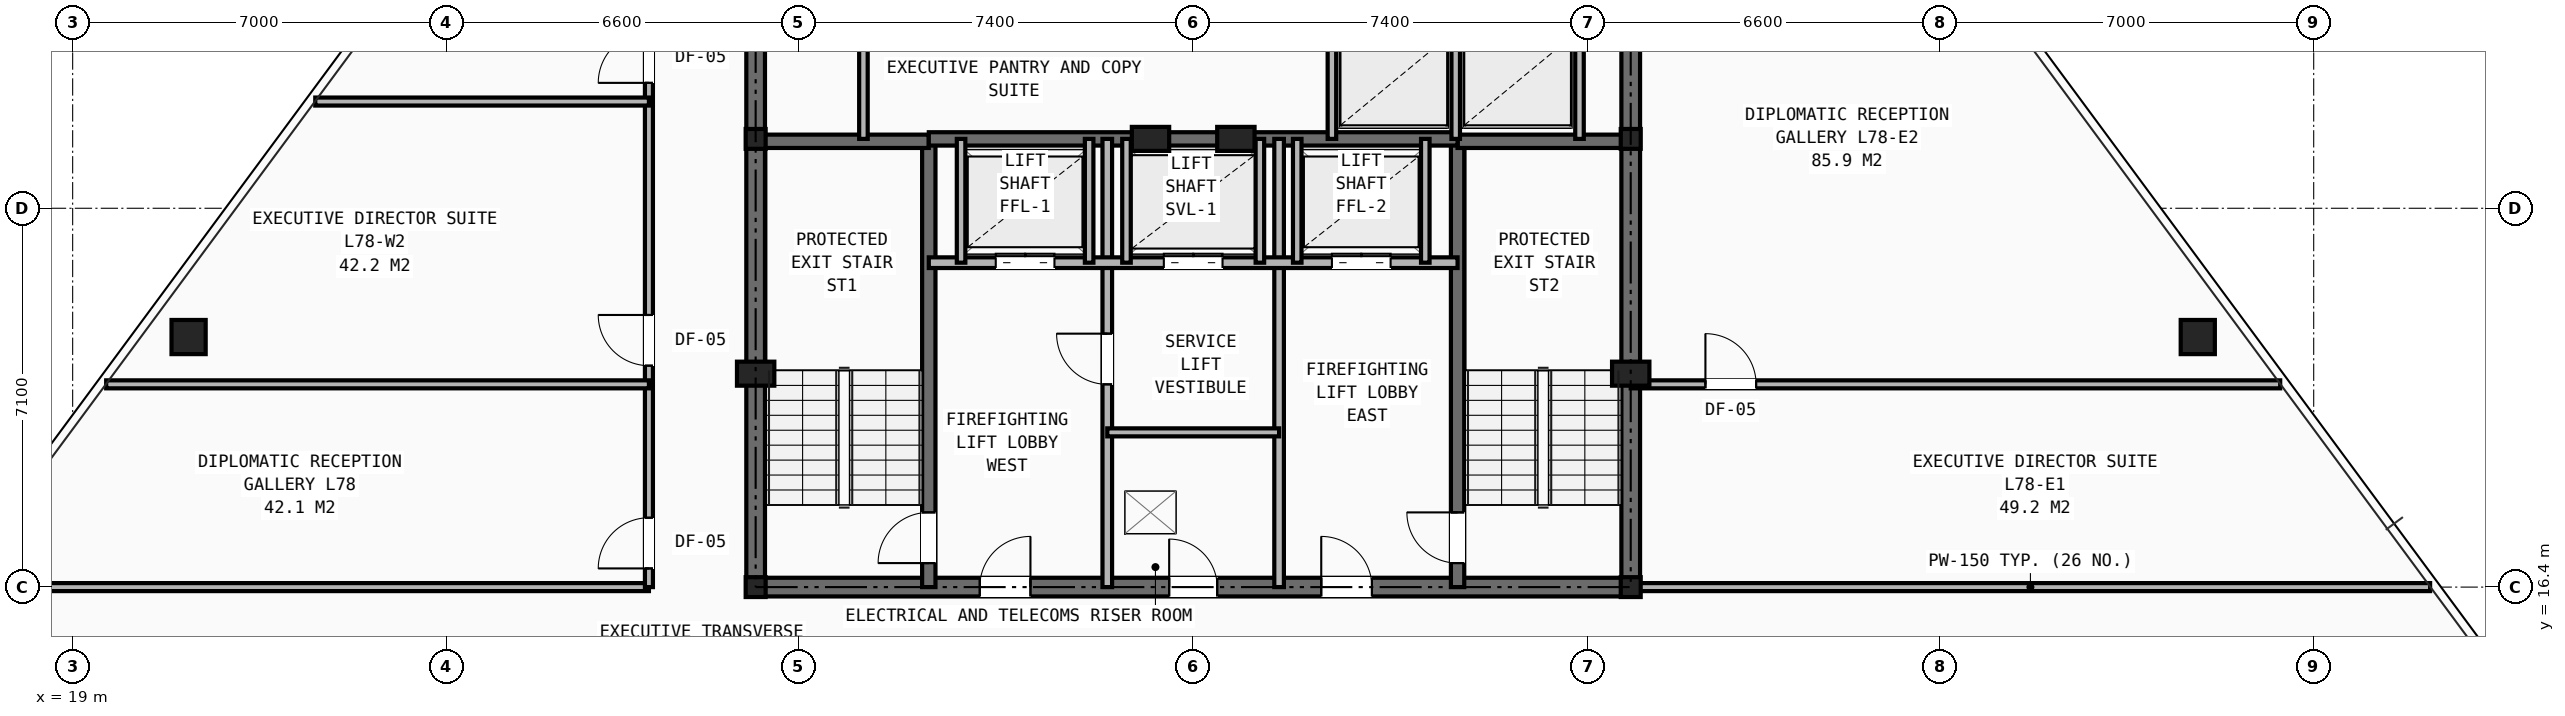
"""IFC4 building model, lengths in metres.
Left out: names, types, materials, properties, quantities, classifications, styles, units other than length and angle.
Written with IfcOpenShell. Run it as: python <this file> out.ifc"""

import sys

from ifc_helpers import new_model, si_unit, direction, frame, frame_2d, origin, origin_2d, place, context, subcontext, project, spatial, rectangle, hollow_rectangle, i_section, extrude, element, fill, save


model = new_model("IFC4")
c1 = context("Model", 3, precision=1e-05, world=origin(), true_north=direction((0.0, 1.0)))
c2 = subcontext(c1, "Body", "Model", "MODEL_VIEW")
j1 = project(units=[si_unit("LENGTHUNIT", "METRE"), si_unit("PLANEANGLEUNIT", "RADIAN")], contexts=[c1])
p1 = place(None, origin())
s1 = spatial("IfcSite", under=j1, at=p1, CompositionType="ELEMENT")
p2 = place(p1, origin())
s2 = spatial("IfcBuilding", under=s1, at=p2, CompositionType="ELEMENT")
p3 = place(p2, frame((0.0, 0.0, 276.0)))
s3 = spatial("IfcBuildingStorey", under=s2, at=p3, CompositionType="ELEMENT", Elevation=276.0)
for number, where, z_axis, x_axis in (
    (1, (31.8, 16.4, 0.0), (0.0, 0.0, 1.0), (1.0, 0.0, 0.0)),
    (2, (48.2, 16.4, 0.0), (0.0, 0.0, 1.0), (1.0, 0.0, 0.0)),
    (3, (31.8, 24.8, 0.0), (0.0, 0.0, 1.0), (1.0, 0.0, 0.0)),
    (4, (48.2, 24.8, 0.0), (0.0, 0.0, 1.0), (1.0, 0.0, 0.0)),
):
    element("IfcColumn", number, at=place(p3, frame(where, z_axis=z_axis, x_axis=x_axis)), inside=s3, PredefinedType="COLUMN", context=c2, shape_type="SweptSolid", body=[
        extrude(i_section(OverallWidth=0.374, OverallDepth=0.372, WebThickness=0.016, FlangeThickness=0.026, at=origin_2d()), origin(), (0.0, 0.0, 1.0), 3.5),
    ])
for number, where, z_axis, x_axis in (
    (5, (31.8, 20.4, 0.0), (0.0, 0.0, 1.0), (1.0, 0.0, 0.0)),
    (6, (48.2, 20.4, 0.0), (0.0, 0.0, 1.0), (1.0, 0.0, 0.0)),
    (7, (39.2, 24.8, 0.0), (0.0, 0.0, 1.0), (1.0, 0.0, 0.0)),
    (8, (40.8, 24.8, 0.0), (0.0, 0.0, 1.0), (1.0, 0.0, 0.0)),
):
    element("IfcColumn", number, at=place(p3, frame(where, z_axis=z_axis, x_axis=x_axis)), inside=s3, PredefinedType="PILASTER", context=c2, shape_type="SweptSolid", body=[
        extrude(rectangle(XDim=0.7, YDim=0.45, at=origin_2d()), origin(), (0.0, 0.0, 1.0), 3.5),
    ])
for number, where, z_axis, x_axis in (
    (9, (21.173, 21.086, 0.0), (0.0, 0.0, 1.0), (1.0, 0.0, 0.0)),
    (10, (58.827, 21.086, 0.0), (0.0, 0.0, 1.0), (1.0, 0.0, 0.0)),
):
    element("IfcColumn", number, at=place(p3, frame(where, z_axis=z_axis, x_axis=x_axis)), inside=s3, PredefinedType="COLUMN", context=c2, shape_type="SweptSolid", body=[
        extrude(hollow_rectangle(XDim=0.64, YDim=0.64, WallThickness=0.045, at=origin_2d()), origin(), (0.0, 0.0, 1.0), 3.5),
    ])
p4 = place(p3, frame((31.8, 16.4, 0.0), z_axis=(0.0, 0.0, 1.0), x_axis=(1.0, 0.0, 0.0)))
e11 = element("IfcWall", 11, at=p4, inside=s3, PredefinedType="SHEAR", context=c2, shape_type="SweptSolid", body=[
    extrude(rectangle(XDim=16.4, YDim=0.35, at=frame_2d((8.2, 0.0))), origin(), (0.0, 0.0, 1.0), 3.25),
])
p5 = place(p4, frame((7.75, 0.0, 0.0)))
e12 = element("IfcOpeningElement", 12, at=p5, cuts=e11, PredefinedType="OPENING", context=c2, shape_type="SweptSolid", body=[
    extrude(rectangle(XDim=0.9, YDim=2.1, at=frame_2d((0.45, 1.05))), frame((0.0, 0.185, 0.0), z_axis=(0.0, -1.0, 0.0), x_axis=(1.0, 0.0, 0.0)), (0.0, 0.0, 1.0), 0.37),
])
p6 = place(p4, frame((4.2, 0.0, 0.0)))
e13 = element("IfcOpeningElement", 13, at=p6, cuts=e11, PredefinedType="OPENING", context=c2, shape_type="SweptSolid", body=[
    extrude(rectangle(XDim=0.95, YDim=2.1, at=frame_2d((0.475, 1.05))), frame((0.0, 0.185, 0.0), z_axis=(0.0, -1.0, 0.0), x_axis=(1.0, 0.0, 0.0)), (0.0, 0.0, 1.0), 0.37),
])
p7 = place(p4, frame((10.6, 0.0, 0.0)))
e14 = element("IfcOpeningElement", 14, at=p7, cuts=e11, PredefinedType="OPENING", context=c2, shape_type="SweptSolid", body=[
    extrude(rectangle(XDim=0.95, YDim=2.1, at=frame_2d((0.475, 1.05))), frame((0.0, 0.185, 0.0), z_axis=(0.0, -1.0, 0.0), x_axis=(1.0, 0.0, 0.0)), (0.0, 0.0, 1.0), 0.37),
])
p8 = place(p3, frame((31.8, 16.4, 0.0), z_axis=(0.0, 0.0, 1.0), x_axis=(0.0, 1.0, 0.0)))
e15 = element("IfcWall", 15, at=p8, inside=s3, PredefinedType="SHEAR", context=c2, shape_type="SweptSolid", body=[
    extrude(rectangle(XDim=14.8, YDim=0.35, at=frame_2d((7.4, 0.0))), origin(), (0.0, 0.0, 1.0), 3.25),
])
p9 = place(p8, frame((11.0, 0.0, 0.0)))
e16 = element("IfcOpeningElement", 16, at=p9, cuts=e15, PredefinedType="OPENING", context=c2, shape_type="SweptSolid", body=[
    extrude(rectangle(XDim=1.1, YDim=2.15, at=frame_2d((0.55, 1.075))), frame((0.0, 0.185, 0.0), z_axis=(0.0, -1.0, 0.0), x_axis=(1.0, 0.0, 0.0)), (0.0, 0.0, 1.0), 0.37),
])
p10 = place(p3, frame((48.2, 16.4, 0.0), z_axis=(0.0, 0.0, 1.0), x_axis=(0.0, 1.0, 0.0)))
e17 = element("IfcWall", 17, at=p10, inside=s3, PredefinedType="SHEAR", context=c2, shape_type="SweptSolid", body=[
    extrude(rectangle(XDim=14.8, YDim=0.35, at=frame_2d((7.4, 0.0))), origin(), (0.0, 0.0, 1.0), 3.25),
])
p11 = place(p10, frame((11.0, 0.0, 0.0)))
e18 = element("IfcOpeningElement", 18, at=p11, cuts=e17, PredefinedType="OPENING", context=c2, shape_type="SweptSolid", body=[
    extrude(rectangle(XDim=1.1, YDim=2.15, at=frame_2d((0.55, 1.075))), frame((0.0, 0.185, 0.0), z_axis=(0.0, -1.0, 0.0), x_axis=(1.0, 0.0, 0.0)), (0.0, 0.0, 1.0), 0.37),
])
p12 = place(p3, frame((35.045, 16.4, 0.0), z_axis=(0.0, 0.0, 1.0), x_axis=(0.0, 1.0, 0.0)))
e19 = element("IfcWall", 19, at=p12, inside=s3, PredefinedType="SHEAR", context=c2, shape_type="SweptSolid", body=[
    extrude(rectangle(XDim=8.4, YDim=0.25, at=frame_2d((4.2, 0.0))), origin(), (0.0, 0.0, 1.0), 3.25),
])
p13 = place(p12, frame((0.45, 0.0, 0.0)))
e20 = element("IfcOpeningElement", 20, at=p13, cuts=e19, PredefinedType="OPENING", context=c2, shape_type="SweptSolid", body=[
    extrude(rectangle(XDim=0.95, YDim=2.1, at=frame_2d((0.475, 1.05))), frame((0.0, 0.135, 0.0), z_axis=(0.0, -1.0, 0.0), x_axis=(1.0, 0.0, 0.0)), (0.0, 0.0, 1.0), 0.27),
])
p14 = place(p3, frame((31.8, 24.755, 0.0), z_axis=(0.0, 0.0, 1.0), x_axis=(1.0, 0.0, 0.0)))
e21 = element("IfcWall", 21, at=p14, inside=s3, PredefinedType="SHEAR", context=c2, shape_type="SweptSolid", body=[
    extrude(rectangle(XDim=3.245, YDim=0.25, at=frame_2d((1.623, 0.0))), origin(), (0.0, 0.0, 1.0), 3.25),
])
p15 = place(p3, frame((44.955, 16.4, 0.0), z_axis=(0.0, 0.0, 1.0), x_axis=(0.0, 1.0, 0.0)))
e22 = element("IfcWall", 22, at=p15, inside=s3, PredefinedType="SHEAR", context=c2, shape_type="SweptSolid", body=[
    extrude(rectangle(XDim=8.4, YDim=0.25, at=frame_2d((4.2, 0.0))), origin(), (0.0, 0.0, 1.0), 3.25),
])
p16 = place(p15, frame((0.45, 0.0, 0.0)))
e23 = element("IfcOpeningElement", 23, at=p16, cuts=e22, PredefinedType="OPENING", context=c2, shape_type="SweptSolid", body=[
    extrude(rectangle(XDim=0.95, YDim=2.1, at=frame_2d((0.475, 1.05))), frame((0.0, 0.135, 0.0), z_axis=(0.0, -1.0, 0.0), x_axis=(1.0, 0.0, 0.0)), (0.0, 0.0, 1.0), 0.27),
])
p17 = place(p3, frame((44.955, 24.755, 0.0), z_axis=(0.0, 0.0, 1.0), x_axis=(1.0, 0.0, 0.0)))
e24 = element("IfcWall", 24, at=p17, inside=s3, PredefinedType="SHEAR", context=c2, shape_type="SweptSolid", body=[
    extrude(rectangle(XDim=3.245, YDim=0.25, at=frame_2d((1.623, 0.0))), origin(), (0.0, 0.0, 1.0), 3.25),
])
p18 = place(p3, frame((35.045, 24.8, 0.0), z_axis=(0.0, 0.0, 1.0), x_axis=(1.0, 0.0, 0.0)))
e25 = element("IfcWall", 25, at=p18, inside=s3, PredefinedType="SHEAR", context=c2, shape_type="SweptSolid", body=[
    extrude(rectangle(XDim=9.91, YDim=0.25, at=frame_2d((4.955, 0.0))), origin(), (0.0, 0.0, 1.0), 3.25),
])
p19 = place(p3, frame((38.39, 16.4, 0.0), z_axis=(0.0, 0.0, 1.0), x_axis=(0.0, 1.0, 0.0)))
e26 = element("IfcWall", 26, at=p19, inside=s3, PredefinedType="PARTITIONING", context=c2, shape_type="SweptSolid", body=[
    extrude(rectangle(XDim=8.4, YDim=0.18, at=frame_2d((4.2, 0.0))), origin(), (0.0, 0.0, 1.0), 2.705),
])
p20 = place(p19, frame((3.8, 0.0, 0.0)))
e27 = element("IfcOpeningElement", 27, at=p20, cuts=e26, PredefinedType="OPENING", context=c2, shape_type="SweptSolid", body=[
    extrude(rectangle(XDim=0.95, YDim=2.1, at=frame_2d((0.475, 1.05))), frame((0.0, 0.1, 0.0), z_axis=(0.0, -1.0, 0.0), x_axis=(1.0, 0.0, 0.0)), (0.0, 0.0, 1.0), 0.2),
])
p21 = place(p3, frame((41.61, 16.4, 0.0), z_axis=(0.0, 0.0, 1.0), x_axis=(0.0, 1.0, 0.0)))
e28 = element("IfcWall", 28, at=p21, inside=s3, PredefinedType="PARTITIONING", context=c2, shape_type="SweptSolid", body=[
    extrude(rectangle(XDim=8.4, YDim=0.18, at=frame_2d((4.2, 0.0))), origin(), (0.0, 0.0, 1.0), 2.705),
])
p22 = place(p3, frame((35.045, 22.48, 0.0), z_axis=(0.0, 0.0, 1.0), x_axis=(1.0, 0.0, 0.0)))
e29 = element("IfcWall", 29, at=p22, inside=s3, PredefinedType="SOLIDWALL", context=c2, shape_type="SweptSolid", body=[
    extrude(rectangle(XDim=9.91, YDim=0.2, at=frame_2d((4.955, 0.0))), origin(), (0.0, 0.0, 1.0), 3.25),
])
p23 = place(p22, frame((1.255, 0.0, 0.0)))
e30 = element("IfcOpeningElement", 30, at=p23, cuts=e29, PredefinedType="OPENING", context=c2, shape_type="SweptSolid", body=[
    extrude(rectangle(XDim=1.1, YDim=2.15, at=frame_2d((0.55, 1.075))), frame((0.0, 0.11, 0.0), z_axis=(0.0, -1.0, 0.0), x_axis=(1.0, 0.0, 0.0)), (0.0, 0.0, 1.0), 0.22),
])
p24 = place(p22, frame((7.555, 0.0, 0.0)))
e31 = element("IfcOpeningElement", 31, at=p24, cuts=e29, PredefinedType="OPENING", context=c2, shape_type="SweptSolid", body=[
    extrude(rectangle(XDim=1.1, YDim=2.15, at=frame_2d((0.55, 1.075))), frame((0.0, 0.11, 0.0), z_axis=(0.0, -1.0, 0.0), x_axis=(1.0, 0.0, 0.0)), (0.0, 0.0, 1.0), 0.22),
])
p25 = place(p22, frame((4.405, 0.0, 0.0)))
e32 = element("IfcOpeningElement", 32, at=p25, cuts=e29, PredefinedType="OPENING", context=c2, shape_type="SweptSolid", body=[
    extrude(rectangle(XDim=1.1, YDim=2.15, at=frame_2d((0.55, 1.075))), frame((0.0, 0.11, 0.0), z_axis=(0.0, -1.0, 0.0), x_axis=(1.0, 0.0, 0.0)), (0.0, 0.0, 1.0), 0.22),
])
p26 = place(p3, frame((38.39, 19.3, 0.0), z_axis=(0.0, 0.0, 1.0), x_axis=(1.0, 0.0, 0.0)))
e33 = element("IfcWall", 33, at=p26, inside=s3, PredefinedType="PARTITIONING", context=c2, shape_type="SweptSolid", body=[
    extrude(rectangle(XDim=3.22, YDim=0.15, at=frame_2d((1.61, 0.0))), origin(), (0.0, 0.0, 1.0), 3.25),
])
for number, where, z_axis, x_axis in (
    (34, (35.65, 22.48, 0.0), (0.0, 0.0, 1.0), (0.0, 1.0, 0.0)),
    (35, (38.05, 22.48, 0.0), (0.0, 0.0, 1.0), (0.0, 1.0, 0.0)),
    (36, (41.95, 22.48, 0.0), (0.0, 0.0, 1.0), (0.0, 1.0, 0.0)),
    (37, (44.35, 22.48, 0.0), (0.0, 0.0, 1.0), (0.0, 1.0, 0.0)),
    (38, (38.75, 22.48, 0.0), (0.0, 0.0, 1.0), (0.0, 1.0, 0.0)),
    (39, (41.25, 22.48, 0.0), (0.0, 0.0, 1.0), (0.0, 1.0, 0.0)),
):
    element("IfcWall", number, at=place(p3, frame(where, z_axis=z_axis, x_axis=x_axis)), inside=s3, PredefinedType="SOLIDWALL", context=c2, shape_type="SweptSolid", body=[
        extrude(rectangle(XDim=2.32, YDim=0.16, at=frame_2d((1.16, 0.0))), origin(), (0.0, 0.0, 1.0), 3.25),
    ])
for number, where, z_axis, x_axis in (
    (40, (33.82, 24.8, 0.0), (0.0, 0.0, 1.0), (0.0, 1.0, 0.0)),
    (41, (42.6, 24.8, 0.0), (0.0, 0.0, 1.0), (0.0, 1.0, 0.0)),
    (42, (44.92, 24.8, 0.0), (0.0, 0.0, 1.0), (0.0, 1.0, 0.0)),
    (43, (47.24, 24.8, 0.0), (0.0, 0.0, 1.0), (0.0, 1.0, 0.0)),
):
    element("IfcWall", number, at=place(p3, frame(where, z_axis=z_axis, x_axis=x_axis)), inside=s3, PredefinedType="SOLIDWALL", context=c2, shape_type="SweptSolid", body=[
        extrude(rectangle(XDim=2.08, YDim=0.16, at=frame_2d((1.04, 0.0))), origin(), (0.0, 0.0, 1.0), 3.25),
    ])
p27 = place(p3, frame((16.818, 16.4, 0.0), z_axis=(0.0, 0.0, 1.0), x_axis=(1.0, 0.0, 0.0)))
e44 = element("IfcWall", 44, at=p27, inside=s3, PredefinedType="PARTITIONING", context=c2, shape_type="SweptSolid", body=[
    extrude(rectangle(XDim=12.982, YDim=0.15, at=frame_2d((6.491, 0.0))), origin(), (0.0, 0.0, 1.0), 2.292),
])
p28 = place(p3, frame((48.2, 16.4, 0.0), z_axis=(0.0, 0.0, 1.0), x_axis=(1.0, 0.0, 0.0)))
e45 = element("IfcWall", 45, at=p28, inside=s3, PredefinedType="PARTITIONING", context=c2, shape_type="SweptSolid", body=[
    extrude(rectangle(XDim=14.982, YDim=0.15, at=frame_2d((7.491, 0.0))), origin(), (0.0, 0.0, 1.0), 2.292),
])
p29 = place(p3, frame((29.8, 16.4, 0.0), z_axis=(0.0, 0.0, 1.0), x_axis=(0.0, 1.0, 0.0)))
e46 = element("IfcWall", 46, at=p29, inside=s3, PredefinedType="PARTITIONING", context=c2, shape_type="SweptSolid", body=[
    extrude(rectangle(XDim=19.3, YDim=0.15, at=frame_2d((9.65, 0.0))), origin(), (0.0, 0.0, 1.0), 2.292),
])
p30 = place(p29, frame((0.35, 0.0, 0.0)))
e47 = element("IfcOpeningElement", 47, at=p30, cuts=e46, PredefinedType="OPENING", context=c2, shape_type="SweptSolid", body=[
    extrude(rectangle(XDim=0.95, YDim=2.1, at=frame_2d((0.475, 1.05))), frame((0.0, 0.085, 0.0), z_axis=(0.0, -1.0, 0.0), x_axis=(1.0, 0.0, 0.0)), (0.0, 0.0, 1.0), 0.17),
])
p31 = place(p29, frame((4.15, 0.0, 0.0)))
e48 = element("IfcOpeningElement", 48, at=p31, cuts=e46, PredefinedType="OPENING", context=c2, shape_type="SweptSolid", body=[
    extrude(rectangle(XDim=0.95, YDim=2.1, at=frame_2d((0.475, 1.05))), frame((0.0, 0.085, 0.0), z_axis=(0.0, -1.0, 0.0), x_axis=(1.0, 0.0, 0.0)), (0.0, 0.0, 1.0), 0.17),
])
p32 = place(p29, frame((9.45, 0.0, 0.0)))
e49 = element("IfcOpeningElement", 49, at=p32, cuts=e46, PredefinedType="OPENING", context=c2, shape_type="SweptSolid", body=[
    extrude(rectangle(XDim=0.95, YDim=2.1, at=frame_2d((0.475, 1.05))), frame((0.0, 0.085, 0.0), z_axis=(0.0, -1.0, 0.0), x_axis=(1.0, 0.0, 0.0)), (0.0, 0.0, 1.0), 0.17),
])
p33 = place(p3, frame((19.628, 20.2, 0.0), z_axis=(0.0, 0.0, 1.0), x_axis=(1.0, 0.0, 0.0)))
e50 = element("IfcWall", 50, at=p33, inside=s3, PredefinedType="PARTITIONING", context=c2, shape_type="SweptSolid", body=[
    extrude(rectangle(XDim=10.172, YDim=0.15, at=frame_2d((5.086, 0.0))), origin(), (0.0, 0.0, 1.0), 2.292),
])
p34 = place(p3, frame((23.547, 25.5, 0.0), z_axis=(0.0, 0.0, 1.0), x_axis=(1.0, 0.0, 0.0)))
e51 = element("IfcWall", 51, at=p34, inside=s3, PredefinedType="PARTITIONING", context=c2, shape_type="SweptSolid", body=[
    extrude(rectangle(XDim=6.253, YDim=0.15, at=frame_2d((3.127, 0.0))), origin(), (0.0, 0.0, 1.0), 2.628),
])
p35 = place(p3, frame((48.2, 20.2, 0.0), z_axis=(0.0, 0.0, 1.0), x_axis=(1.0, 0.0, 0.0)))
e52 = element("IfcWall", 52, at=p35, inside=s3, PredefinedType="PARTITIONING", context=c2, shape_type="SweptSolid", body=[
    extrude(rectangle(XDim=12.172, YDim=0.15, at=frame_2d((6.086, 0.0))), origin(), (0.0, 0.0, 1.0), 2.292),
])
p36 = place(p35, frame((1.4, 0.0, 0.0)))
e53 = element("IfcOpeningElement", 53, at=p36, cuts=e52, PredefinedType="OPENING", context=c2, shape_type="SweptSolid", body=[
    extrude(rectangle(XDim=0.95, YDim=2.1, at=frame_2d((0.475, 1.05))), frame((0.0, 0.085, 0.0), z_axis=(0.0, -1.0, 0.0), x_axis=(1.0, 0.0, 0.0)), (0.0, 0.0, 1.0), 0.17),
])
p37 = place(p5, origin())
e54 = element("IfcDoor", 54, at=p37, inside=s3, OperationType="SINGLE_SWING_LEFT", PredefinedType="DOOR", context=c2, shape_type="SweptSolid", body=[
    extrude(rectangle(XDim=0.9, YDim=2.1, at=frame_2d((0.45, 1.05))), frame((0.0, 0.025, 0.0), z_axis=(0.0, -1.0, 0.0), x_axis=(1.0, 0.0, 0.0)), (0.0, 0.0, 1.0), 0.05),
])
fill(e12, e54)
p38 = place(p20, origin())
e55 = element("IfcDoor", 55, at=p38, inside=s3, OperationType="SINGLE_SWING_RIGHT", PredefinedType="DOOR", context=c2, shape_type="SweptSolid", body=[
    extrude(rectangle(XDim=0.95, YDim=2.1, at=frame_2d((0.475, 1.05))), frame((0.0, 0.025, 0.0), z_axis=(0.0, -1.0, 0.0), x_axis=(1.0, 0.0, 0.0)), (0.0, 0.0, 1.0), 0.05),
])
fill(e27, e55)
p39 = place(p13, origin())
e56 = element("IfcDoor", 56, at=p39, inside=s3, OperationType="SINGLE_SWING_LEFT", PredefinedType="DOOR", context=c2, shape_type="SweptSolid", body=[
    extrude(rectangle(XDim=0.95, YDim=2.1, at=frame_2d((0.475, 1.05))), frame((0.0, 0.025, 0.0), z_axis=(0.0, -1.0, 0.0), x_axis=(1.0, 0.0, 0.0)), (0.0, 0.0, 1.0), 0.05),
])
fill(e20, e56)
p40 = place(p16, origin())
e57 = element("IfcDoor", 57, at=p40, inside=s3, OperationType="SINGLE_SWING_RIGHT", PredefinedType="DOOR", context=c2, shape_type="SweptSolid", body=[
    extrude(rectangle(XDim=0.95, YDim=2.1, at=frame_2d((0.475, 1.05))), frame((0.0, 0.025, 0.0), z_axis=(0.0, -1.0, 0.0), x_axis=(1.0, 0.0, 0.0)), (0.0, 0.0, 1.0), 0.05),
])
fill(e23, e57)
p41 = place(p6, origin())
e58 = element("IfcDoor", 58, at=p41, inside=s3, OperationType="SINGLE_SWING_RIGHT", PredefinedType="DOOR", context=c2, shape_type="SweptSolid", body=[
    extrude(rectangle(XDim=0.95, YDim=2.1, at=frame_2d((0.475, 1.05))), frame((0.0, 0.025, 0.0), z_axis=(0.0, -1.0, 0.0), x_axis=(1.0, 0.0, 0.0)), (0.0, 0.0, 1.0), 0.05),
])
fill(e13, e58)
p42 = place(p7, origin())
e59 = element("IfcDoor", 59, at=p42, inside=s3, OperationType="SINGLE_SWING_LEFT", PredefinedType="DOOR", context=c2, shape_type="SweptSolid", body=[
    extrude(rectangle(XDim=0.95, YDim=2.1, at=frame_2d((0.475, 1.05))), frame((0.0, 0.025, 0.0), z_axis=(0.0, -1.0, 0.0), x_axis=(1.0, 0.0, 0.0)), (0.0, 0.0, 1.0), 0.05),
])
fill(e14, e59)
p43 = place(p23, origin())
e60 = element("IfcDoor", 60, at=p43, inside=s3, OperationType="DOUBLE_DOOR_SLIDING", PredefinedType="DOOR", context=c2, shape_type="SweptSolid", body=[
    extrude(rectangle(XDim=1.1, YDim=2.15, at=frame_2d((0.55, 1.075))), frame((0.0, 0.025, 0.0), z_axis=(0.0, -1.0, 0.0), x_axis=(1.0, 0.0, 0.0)), (0.0, 0.0, 1.0), 0.05),
])
fill(e30, e60)
p44 = place(p24, origin())
e61 = element("IfcDoor", 61, at=p44, inside=s3, OperationType="DOUBLE_DOOR_SLIDING", PredefinedType="DOOR", context=c2, shape_type="SweptSolid", body=[
    extrude(rectangle(XDim=1.1, YDim=2.15, at=frame_2d((0.55, 1.075))), frame((0.0, 0.025, 0.0), z_axis=(0.0, -1.0, 0.0), x_axis=(1.0, 0.0, 0.0)), (0.0, 0.0, 1.0), 0.05),
])
fill(e31, e61)
p45 = place(p25, origin())
e62 = element("IfcDoor", 62, at=p45, inside=s3, OperationType="DOUBLE_DOOR_SLIDING", PredefinedType="DOOR", context=c2, shape_type="SweptSolid", body=[
    extrude(rectangle(XDim=1.1, YDim=2.15, at=frame_2d((0.55, 1.075))), frame((0.0, 0.025, 0.0), z_axis=(0.0, -1.0, 0.0), x_axis=(1.0, 0.0, 0.0)), (0.0, 0.0, 1.0), 0.05),
])
fill(e32, e62)
p46 = place(p30, origin())
e63 = element("IfcDoor", 63, at=p46, inside=s3, OperationType="SINGLE_SWING_LEFT", PredefinedType="DOOR", context=c2, shape_type="SweptSolid", body=[
    extrude(rectangle(XDim=0.95, YDim=2.1, at=frame_2d((0.475, 1.05))), frame((0.0, 0.025, 0.0), z_axis=(0.0, -1.0, 0.0), x_axis=(1.0, 0.0, 0.0)), (0.0, 0.0, 1.0), 0.05),
])
fill(e47, e63)
p47 = place(p31, origin())
e64 = element("IfcDoor", 64, at=p47, inside=s3, OperationType="SINGLE_SWING_RIGHT", PredefinedType="DOOR", context=c2, shape_type="SweptSolid", body=[
    extrude(rectangle(XDim=0.95, YDim=2.1, at=frame_2d((0.475, 1.05))), frame((0.0, 0.025, 0.0), z_axis=(0.0, -1.0, 0.0), x_axis=(1.0, 0.0, 0.0)), (0.0, 0.0, 1.0), 0.05),
])
fill(e48, e64)
p48 = place(p32, origin())
e65 = element("IfcDoor", 65, at=p48, inside=s3, OperationType="SINGLE_SWING_LEFT", PredefinedType="DOOR", context=c2, shape_type="SweptSolid", body=[
    extrude(rectangle(XDim=0.95, YDim=2.1, at=frame_2d((0.475, 1.05))), frame((0.0, 0.025, 0.0), z_axis=(0.0, -1.0, 0.0), x_axis=(1.0, 0.0, 0.0)), (0.0, 0.0, 1.0), 0.05),
])
fill(e49, e65)
p49 = place(p36, origin())
e66 = element("IfcDoor", 66, at=p49, inside=s3, OperationType="SINGLE_SWING_LEFT", PredefinedType="DOOR", context=c2, shape_type="SweptSolid", body=[
    extrude(rectangle(XDim=0.95, YDim=2.1, at=frame_2d((0.475, 1.05))), frame((0.0, 0.025, 0.0), z_axis=(0.0, -1.0, 0.0), x_axis=(1.0, 0.0, 0.0)), (0.0, 0.0, 1.0), 0.05),
])
fill(e53, e66)
save(model, sys.argv[1])
